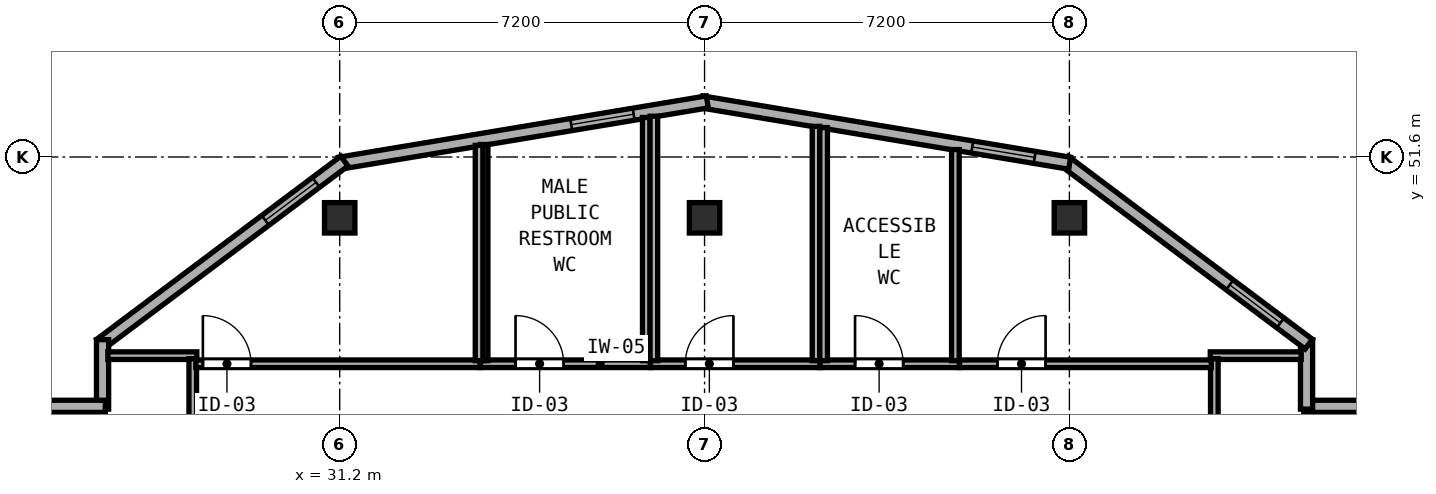
"""IFC4 building model, lengths in metres.
Left out: names, types, materials, properties, quantities, classifications, styles, units other than length and angle.
Written with IfcOpenShell. Run it as: python <this file> out.ifc"""

import sys

from ifc_helpers import new_model, si_unit, direction, frame, frame_2d, origin, origin_2d, place, context, subcontext, project, spatial, rectangle, hollow_rectangle, extrude, element, fill, save


model = new_model("IFC4")
c1 = context("Model", 3, precision=1e-05, world=origin(), true_north=direction((0.0, 1.0)))
c2 = subcontext(c1, "Body", "Model", "MODEL_VIEW")
j1 = project(units=[si_unit("LENGTHUNIT", "METRE"), si_unit("PLANEANGLEUNIT", "RADIAN")], contexts=[c1])
p1 = place(None, origin())
s1 = spatial("IfcSite", under=j1, at=p1, CompositionType="ELEMENT")
p2 = place(p1, origin())
s2 = spatial("IfcBuilding", under=s1, at=p2, CompositionType="ELEMENT")
p3 = place(p2, frame((0.0, 0.0, 318.2)))
s3 = spatial("IfcBuildingStorey", under=s2, at=p3, CompositionType="ELEMENT", Elevation=318.2)
for number, where, z_axis, x_axis in (
    (1, (31.2, 50.4, 0.0), (0.0, 0.0, 1.0), (1.0, 0.0, 0.0)),
    (2, (45.6, 50.4, 0.0), (0.0, 0.0, 1.0), (1.0, 0.0, 0.0)),
    (3, (38.4, 50.4, 0.0), (0.0, 0.0, 1.0), (1.0, 0.0, 0.0)),
):
    element("IfcColumn", number, at=place(p3, frame(where, z_axis=z_axis, x_axis=x_axis)), inside=s3, PredefinedType="COLUMN", context=c2, shape_type="SweptSolid", body=[
        extrude(hollow_rectangle(XDim=0.6, YDim=0.6, WallThickness=0.024, at=origin_2d()), origin(), (0.0, 0.0, 1.0), 5.0),
    ])
p4 = place(p3, frame((51.535, 46.68, 0.0), z_axis=(0.0, 0.0, 1.0), x_axis=(-1.0, 0.0, 0.0)))
e4 = element("IfcWall", 4, at=p4, inside=s3, PredefinedType="SOLIDWALL", context=c2, shape_type="SweptSolid", body=[
    extrude(rectangle(XDim=1.31, YDim=0.24, at=frame_2d((0.655, 0.0))), origin(), (0.0, 0.0, 1.0), 4.76),
])
p5 = place(p3, frame((50.28, 46.625, 0.0), z_axis=(0.0, 0.0, 1.0), x_axis=(0.0, 1.0, 0.0)))
e5 = element("IfcWall", 5, at=p5, inside=s3, PredefinedType="SOLIDWALL", context=c2, shape_type="SweptSolid", body=[
    extrude(rectangle(XDim=1.37, YDim=0.24, at=frame_2d((0.685, 0.0))), origin(), (0.0, 0.0, 1.0), 4.76),
])
p6 = place(p3, frame((50.324, 47.907, 0.0), z_axis=(0.0, 0.0, 1.0), x_axis=(-0.80001459783, 0.599980535734, 0.0)))
e6 = element("IfcWall", 6, at=p6, inside=s3, PredefinedType="SOLIDWALL", context=c2, shape_type="SweptSolid", body=[
    extrude(rectangle(XDim=6.021, YDim=0.24, at=frame_2d((3.01, 0.0))), origin(), (0.0, 0.0, 1.0), 4.76),
])
p7 = place(p6, frame((0.7, 0.0, 0.85)))
e7 = element("IfcOpeningElement", 7, at=p7, cuts=e6, PredefinedType="OPENING", context=c2, shape_type="SweptSolid", body=[
    extrude(rectangle(XDim=1.25, YDim=1.95, at=frame_2d((0.625, 0.975))), frame((0.0, 0.13, 0.0), z_axis=(0.0, -1.0, 0.0), x_axis=(1.0, 0.0, 0.0)), (0.0, 0.0, 1.0), 0.26),
])
p8 = place(p3, frame((45.606, 51.477, 0.0), z_axis=(0.0, 0.0, 1.0), x_axis=(-0.986394820321, 0.164393608283, 0.0)))
e8 = element("IfcWall", 8, at=p8, inside=s3, PredefinedType="SOLIDWALL", context=c2, shape_type="SweptSolid", body=[
    extrude(rectangle(XDim=7.36, YDim=0.24, at=frame_2d((3.68, 0.0))), origin(), (0.0, 0.0, 1.0), 4.76),
])
p9 = place(p8, frame((0.7, 0.0, 0.85)))
e9 = element("IfcOpeningElement", 9, at=p9, cuts=e8, PredefinedType="OPENING", context=c2, shape_type="SweptSolid", body=[
    extrude(rectangle(XDim=1.25, YDim=1.95, at=frame_2d((0.625, 0.975))), frame((0.0, 0.13, 0.0), z_axis=(0.0, -1.0, 0.0), x_axis=(1.0, 0.0, 0.0)), (0.0, 0.0, 1.0), 0.26),
])
p10 = place(p3, frame((38.454, 52.687, 0.0), z_axis=(0.0, 0.0, 1.0), x_axis=(-0.986394820321, -0.164393608283, 0.0)))
e10 = element("IfcWall", 10, at=p10, inside=s3, PredefinedType="SOLIDWALL", context=c2, shape_type="SweptSolid", body=[
    extrude(rectangle(XDim=7.36, YDim=0.24, at=frame_2d((3.68, 0.0))), origin(), (0.0, 0.0, 1.0), 4.76),
])
p11 = place(p10, frame((1.473, 0.0, 0.85)))
e11 = element("IfcOpeningElement", 11, at=p11, cuts=e10, PredefinedType="OPENING", context=c2, shape_type="SweptSolid", body=[
    extrude(rectangle(XDim=1.25, YDim=1.95, at=frame_2d((0.625, 0.975))), frame((0.0, 0.13, 0.0), z_axis=(0.0, -1.0, 0.0), x_axis=(1.0, 0.0, 0.0)), (0.0, 0.0, 1.0), 0.26),
])
p12 = place(p3, frame((31.292, 51.519, 0.0), z_axis=(0.0, 0.0, 1.0), x_axis=(-0.8, -0.6, 0.0)))
e12 = element("IfcWall", 12, at=p12, inside=s3, PredefinedType="SOLIDWALL", context=c2, shape_type="SweptSolid", body=[
    extrude(rectangle(XDim=6.021, YDim=0.24, at=frame_2d((3.01, 0.0))), origin(), (0.0, 0.0, 1.0), 4.76),
])
p13 = place(p12, frame((0.7, 0.0, 0.85)))
e13 = element("IfcOpeningElement", 13, at=p13, cuts=e12, PredefinedType="OPENING", context=c2, shape_type="SweptSolid", body=[
    extrude(rectangle(XDim=1.25, YDim=1.95, at=frame_2d((0.625, 0.975))), frame((0.0, 0.13, 0.0), z_axis=(0.0, -1.0, 0.0), x_axis=(1.0, 0.0, 0.0)), (0.0, 0.0, 1.0), 0.26),
])
p14 = place(p3, frame((26.52, 47.995, 0.0), z_axis=(0.0, 0.0, 1.0), x_axis=(0.0, -1.0, 0.0)))
e14 = element("IfcWall", 14, at=p14, inside=s3, PredefinedType="SOLIDWALL", context=c2, shape_type="SweptSolid", body=[
    extrude(rectangle(XDim=1.37, YDim=0.24, at=frame_2d((0.685, 0.0))), origin(), (0.0, 0.0, 1.0), 4.76),
])
p15 = place(p3, frame((26.575, 46.68, 0.0), z_axis=(0.0, 0.0, 1.0), x_axis=(-1.0, 0.0, 0.0)))
e15 = element("IfcWall", 15, at=p15, inside=s3, PredefinedType="SOLIDWALL", context=c2, shape_type="SweptSolid", body=[
    extrude(rectangle(XDim=1.31, YDim=0.24, at=frame_2d((0.655, 0.0))), origin(), (0.0, 0.0, 1.0), 4.76),
])
p16 = place(p3, frame((33.97, 47.52, 0.0), z_axis=(0.0, 0.0, 1.0), x_axis=(1.0, 0.0, 0.0)))
e16 = element("IfcWall", 16, at=p16, inside=s3, PredefinedType="PARTITIONING", context=c2, shape_type="SweptSolid", body=[
    extrude(rectangle(XDim=3.36, YDim=0.15, at=frame_2d((1.68, 0.0))), origin(), (0.0, 0.0, 1.0), 4.76),
])
p17 = place(p16, frame((0.7, 0.0, 0.0)))
e17 = element("IfcOpeningElement", 17, at=p17, cuts=e16, PredefinedType="OPENING", context=c2, shape_type="SweptSolid", body=[
    extrude(rectangle(XDim=0.95, YDim=2.12, at=frame_2d((0.475, 1.06))), frame((0.0, 0.085, 0.0), z_axis=(0.0, -1.0, 0.0), x_axis=(1.0, 0.0, 0.0)), (0.0, 0.0, 1.0), 0.17),
])
p18 = place(p3, frame((34.05, 47.58, 0.0), z_axis=(0.0, 0.0, 1.0), x_axis=(0.0, 1.0, 0.0)))
e18 = element("IfcWall", 18, at=p18, inside=s3, PredefinedType="PARTITIONING", context=c2, shape_type="SweptSolid", body=[
    extrude(rectangle(XDim=4.267, YDim=0.15, at=frame_2d((2.133, 0.0))), origin(), (0.0, 0.0, 1.0), 4.76),
])
p19 = place(p3, frame((37.25, 47.58, 0.0), z_axis=(0.0, 0.0, 1.0), x_axis=(0.0, 1.0, 0.0)))
e19 = element("IfcWall", 19, at=p19, inside=s3, PredefinedType="PARTITIONING", context=c2, shape_type="SweptSolid", body=[
    extrude(rectangle(XDim=4.8, YDim=0.15, at=frame_2d((2.4, 0.0))), origin(), (0.0, 0.0, 1.0), 4.76),
])
p20 = place(p3, frame((37.332, 47.52, 0.0), z_axis=(0.0, 0.0, 1.0), x_axis=(1.0, 0.0, 0.0)))
e20 = element("IfcWall", 20, at=p20, inside=s3, PredefinedType="PARTITIONING", context=c2, shape_type="SweptSolid", body=[
    extrude(rectangle(XDim=3.348, YDim=0.15, at=frame_2d((1.674, 0.0))), origin(), (0.0, 0.0, 1.0), 4.76),
])
p21 = place(p20, frame((0.688, 0.0, 0.0)))
e21 = element("IfcOpeningElement", 21, at=p21, cuts=e20, PredefinedType="OPENING", context=c2, shape_type="SweptSolid", body=[
    extrude(rectangle(XDim=0.95, YDim=2.12, at=frame_2d((0.475, 1.06))), frame((0.0, 0.085, 0.0), z_axis=(0.0, -1.0, 0.0), x_axis=(1.0, 0.0, 0.0)), (0.0, 0.0, 1.0), 0.17),
])
p22 = place(p3, frame((37.4, 47.58, 0.0), z_axis=(0.0, 0.0, 1.0), x_axis=(0.0, 1.0, 0.0)))
e22 = element("IfcWall", 22, at=p22, inside=s3, PredefinedType="PARTITIONING", context=c2, shape_type="SweptSolid", body=[
    extrude(rectangle(XDim=4.825, YDim=0.15, at=frame_2d((2.413, 0.0))), origin(), (0.0, 0.0, 1.0), 4.76),
])
p23 = place(p3, frame((40.6, 47.58, 0.0), z_axis=(0.0, 0.0, 1.0), x_axis=(0.0, 1.0, 0.0)))
e23 = element("IfcWall", 23, at=p23, inside=s3, PredefinedType="PARTITIONING", context=c2, shape_type="SweptSolid", body=[
    extrude(rectangle(XDim=4.625, YDim=0.15, at=frame_2d((2.312, 0.0))), origin(), (0.0, 0.0, 1.0), 4.76),
])
p24 = place(p3, frame((40.682, 47.52, 0.0), z_axis=(0.0, 0.0, 1.0), x_axis=(1.0, 0.0, 0.0)))
e24 = element("IfcWall", 24, at=p24, inside=s3, PredefinedType="PARTITIONING", context=c2, shape_type="SweptSolid", body=[
    extrude(rectangle(XDim=2.748, YDim=0.15, at=frame_2d((1.374, 0.0))), origin(), (0.0, 0.0, 1.0), 4.76),
])
p25 = place(p24, frame((0.688, 0.0, 0.0)))
e25 = element("IfcOpeningElement", 25, at=p25, cuts=e24, PredefinedType="OPENING", context=c2, shape_type="SweptSolid", body=[
    extrude(rectangle(XDim=0.95, YDim=2.12, at=frame_2d((0.475, 1.06))), frame((0.0, 0.085, 0.0), z_axis=(0.0, -1.0, 0.0), x_axis=(1.0, 0.0, 0.0)), (0.0, 0.0, 1.0), 0.17),
])
p26 = place(p3, frame((40.75, 47.58, 0.0), z_axis=(0.0, 0.0, 1.0), x_axis=(0.0, 1.0, 0.0)))
e26 = element("IfcWall", 26, at=p26, inside=s3, PredefinedType="PARTITIONING", context=c2, shape_type="SweptSolid", body=[
    extrude(rectangle(XDim=4.6, YDim=0.15, at=frame_2d((2.3, 0.0))), origin(), (0.0, 0.0, 1.0), 4.76),
])
p27 = place(p3, frame((43.35, 47.58, 0.0), z_axis=(0.0, 0.0, 1.0), x_axis=(0.0, 1.0, 0.0)))
e27 = element("IfcWall", 27, at=p27, inside=s3, PredefinedType="PARTITIONING", context=c2, shape_type="SweptSolid", body=[
    extrude(rectangle(XDim=4.167, YDim=0.15, at=frame_2d((2.083, 0.0))), origin(), (0.0, 0.0, 1.0), 4.76),
])
p28 = place(p3, frame((26.625, 47.68, 0.0), z_axis=(0.0, 0.0, 1.0), x_axis=(1.0, 0.0, 0.0)))
e28 = element("IfcWall", 28, at=p28, inside=s3, PredefinedType="PARTITIONING", context=c2, shape_type="SweptSolid", body=[
    extrude(rectangle(XDim=1.755, YDim=0.15, at=frame_2d((0.877, 0.0))), origin(), (0.0, 0.0, 1.0), 4.76),
])
p29 = place(p3, frame((28.3, 41.42, 0.0), z_axis=(0.0, 0.0, 1.0), x_axis=(0.0, 1.0, 0.0)))
e29 = element("IfcWall", 29, at=p29, inside=s3, PredefinedType="PARTITIONING", context=c2, shape_type="SweptSolid", body=[
    extrude(rectangle(XDim=6.2, YDim=0.15, at=frame_2d((3.1, 0.0))), origin(), (0.0, 0.0, 1.0), 4.76),
])
p30 = place(p29, frame((3.61, 0.0, 0.0), z_axis=(0.0, 0.0, 1.0), x_axis=(-1.0, 0.0, 0.0)))
e30 = element("IfcOpeningElement", 30, at=p30, cuts=e29, PredefinedType="OPENING", context=c2, shape_type="SweptSolid", body=[
    extrude(rectangle(XDim=0.95, YDim=2.12, at=frame_2d((0.475, 1.06))), frame((0.0, 0.085, 0.0), z_axis=(0.0, -1.0, 0.0), x_axis=(1.0, 0.0, 0.0)), (0.0, 0.0, 1.0), 0.17),
])
p31 = place(p3, frame((48.38, 47.68, 0.0), z_axis=(0.0, 0.0, 1.0), x_axis=(1.0, 0.0, 0.0)))
e31 = element("IfcWall", 31, at=p31, inside=s3, PredefinedType="PARTITIONING", context=c2, shape_type="SweptSolid", body=[
    extrude(rectangle(XDim=1.795, YDim=0.15, at=frame_2d((0.897, 0.0))), origin(), (0.0, 0.0, 1.0), 4.76),
])
p32 = place(p3, frame((48.46, 36.42, 0.0), z_axis=(0.0, 0.0, 1.0), x_axis=(0.0, 1.0, 0.0)))
e32 = element("IfcWall", 32, at=p32, inside=s3, PredefinedType="PARTITIONING", context=c2, shape_type="SweptSolid", body=[
    extrude(rectangle(XDim=11.2, YDim=0.15, at=frame_2d((5.6, 0.0))), origin(), (0.0, 0.0, 1.0), 4.76),
])
p33 = place(p32, frame((3.36, 0.0, 0.0)))
e33 = element("IfcOpeningElement", 33, at=p33, cuts=e32, PredefinedType="OPENING", context=c2, shape_type="SweptSolid", body=[
    extrude(rectangle(XDim=0.95, YDim=2.12, at=frame_2d((0.475, 1.06))), frame((0.0, 0.085, 0.0), z_axis=(0.0, -1.0, 0.0), x_axis=(1.0, 0.0, 0.0)), (0.0, 0.0, 1.0), 0.17),
])
p34 = place(p3, frame((28.36, 47.52, 0.0), z_axis=(0.0, 0.0, 1.0), x_axis=(1.0, 0.0, 0.0)))
e34 = element("IfcWall", 34, at=p34, inside=s3, PredefinedType="PARTITIONING", context=c2, shape_type="SweptSolid", body=[
    extrude(rectangle(XDim=5.608, YDim=0.15, at=frame_2d((2.804, 0.0))), origin(), (0.0, 0.0, 1.0), 4.76),
])
p35 = place(p34, frame((0.14, 0.0, 0.0)))
e35 = element("IfcOpeningElement", 35, at=p35, cuts=e34, PredefinedType="OPENING", context=c2, shape_type="SweptSolid", body=[
    extrude(rectangle(XDim=0.95, YDim=2.12, at=frame_2d((0.475, 1.06))), frame((0.0, 0.085, 0.0), z_axis=(0.0, -1.0, 0.0), x_axis=(1.0, 0.0, 0.0)), (0.0, 0.0, 1.0), 0.17),
])
p36 = place(p3, frame((33.95, 47.58, 0.0), z_axis=(0.0, 0.0, 1.0), x_axis=(0.0, 1.0, 0.0)))
e36 = element("IfcWall", 36, at=p36, inside=s3, PredefinedType="PARTITIONING", context=c2, shape_type="SweptSolid", body=[
    extrude(rectangle(XDim=4.25, YDim=0.15, at=frame_2d((2.125, 0.0))), origin(), (0.0, 0.0, 1.0), 4.76),
])
p37 = place(p3, frame((43.432, 47.52, 0.0), z_axis=(0.0, 0.0, 1.0), x_axis=(1.0, 0.0, 0.0)))
e37 = element("IfcWall", 37, at=p37, inside=s3, PredefinedType="PARTITIONING", context=c2, shape_type="SweptSolid", body=[
    extrude(rectangle(XDim=4.968, YDim=0.15, at=frame_2d((2.484, 0.0))), origin(), (0.0, 0.0, 1.0), 4.76),
])
p38 = place(p37, frame((0.748, 0.0, 0.0)))
e38 = element("IfcOpeningElement", 38, at=p38, cuts=e37, PredefinedType="OPENING", context=c2, shape_type="SweptSolid", body=[
    extrude(rectangle(XDim=0.95, YDim=2.12, at=frame_2d((0.475, 1.06))), frame((0.0, 0.085, 0.0), z_axis=(0.0, -1.0, 0.0), x_axis=(1.0, 0.0, 0.0)), (0.0, 0.0, 1.0), 0.17),
])
p39 = place(p7, origin())
e39 = element("IfcWindow", 39, at=p39, inside=s3, PartitioningType="SINGLE_PANEL", PredefinedType="WINDOW", context=c2, shape_type="SweptSolid", body=[
    extrude(rectangle(XDim=1.25, YDim=1.95, at=frame_2d((0.625, 0.975))), frame((0.0, 0.03, 0.0), z_axis=(0.0, -1.0, 0.0), x_axis=(1.0, 0.0, 0.0)), (0.0, 0.0, 1.0), 0.06),
])
fill(e7, e39)
p40 = place(p9, origin())
e40 = element("IfcWindow", 40, at=p40, inside=s3, PartitioningType="SINGLE_PANEL", PredefinedType="WINDOW", context=c2, shape_type="SweptSolid", body=[
    extrude(rectangle(XDim=1.25, YDim=1.95, at=frame_2d((0.625, 0.975))), frame((0.0, 0.03, 0.0), z_axis=(0.0, -1.0, 0.0), x_axis=(1.0, 0.0, 0.0)), (0.0, 0.0, 1.0), 0.06),
])
fill(e9, e40)
p41 = place(p11, origin())
e41 = element("IfcWindow", 41, at=p41, inside=s3, PartitioningType="SINGLE_PANEL", PredefinedType="WINDOW", context=c2, shape_type="SweptSolid", body=[
    extrude(rectangle(XDim=1.25, YDim=1.95, at=frame_2d((0.625, 0.975))), frame((0.0, 0.03, 0.0), z_axis=(0.0, -1.0, 0.0), x_axis=(1.0, 0.0, 0.0)), (0.0, 0.0, 1.0), 0.06),
])
fill(e11, e41)
p42 = place(p13, origin())
e42 = element("IfcWindow", 42, at=p42, inside=s3, PartitioningType="SINGLE_PANEL", PredefinedType="WINDOW", context=c2, shape_type="SweptSolid", body=[
    extrude(rectangle(XDim=1.25, YDim=1.95, at=frame_2d((0.625, 0.975))), frame((0.0, 0.03, 0.0), z_axis=(0.0, -1.0, 0.0), x_axis=(1.0, 0.0, 0.0)), (0.0, 0.0, 1.0), 0.06),
])
fill(e13, e42)
p43 = place(p17, origin())
e43 = element("IfcDoor", 43, at=p43, inside=s3, OperationType="SINGLE_SWING_LEFT", PredefinedType="DOOR", context=c2, shape_type="SweptSolid", body=[
    extrude(rectangle(XDim=0.95, YDim=2.12, at=frame_2d((0.475, 1.06))), frame((0.0, 0.025, 0.0), z_axis=(0.0, -1.0, 0.0), x_axis=(1.0, 0.0, 0.0)), (0.0, 0.0, 1.0), 0.05),
])
fill(e17, e43)
p44 = place(p21, origin())
e44 = element("IfcDoor", 44, at=p44, inside=s3, OperationType="SINGLE_SWING_RIGHT", PredefinedType="DOOR", context=c2, shape_type="SweptSolid", body=[
    extrude(rectangle(XDim=0.95, YDim=2.12, at=frame_2d((0.475, 1.06))), frame((0.0, 0.025, 0.0), z_axis=(0.0, -1.0, 0.0), x_axis=(1.0, 0.0, 0.0)), (0.0, 0.0, 1.0), 0.05),
])
fill(e21, e44)
p45 = place(p25, origin())
e45 = element("IfcDoor", 45, at=p45, inside=s3, OperationType="SINGLE_SWING_LEFT", PredefinedType="DOOR", context=c2, shape_type="SweptSolid", body=[
    extrude(rectangle(XDim=0.95, YDim=2.12, at=frame_2d((0.475, 1.06))), frame((0.0, 0.025, 0.0), z_axis=(0.0, -1.0, 0.0), x_axis=(1.0, 0.0, 0.0)), (0.0, 0.0, 1.0), 0.05),
])
fill(e25, e45)
p46 = place(p35, origin())
e46 = element("IfcDoor", 46, at=p46, inside=s3, OperationType="SINGLE_SWING_LEFT", PredefinedType="DOOR", context=c2, shape_type="SweptSolid", body=[
    extrude(rectangle(XDim=0.95, YDim=2.12, at=frame_2d((0.475, 1.06))), frame((0.0, 0.025, 0.0), z_axis=(0.0, -1.0, 0.0), x_axis=(1.0, 0.0, 0.0)), (0.0, 0.0, 1.0), 0.05),
])
fill(e35, e46)
p47 = place(p38, origin())
e47 = element("IfcDoor", 47, at=p47, inside=s3, OperationType="SINGLE_SWING_RIGHT", PredefinedType="DOOR", context=c2, shape_type="SweptSolid", body=[
    extrude(rectangle(XDim=0.95, YDim=2.12, at=frame_2d((0.475, 1.06))), frame((0.0, 0.025, 0.0), z_axis=(0.0, -1.0, 0.0), x_axis=(1.0, 0.0, 0.0)), (0.0, 0.0, 1.0), 0.05),
])
fill(e38, e47)
save(model, sys.argv[1])
